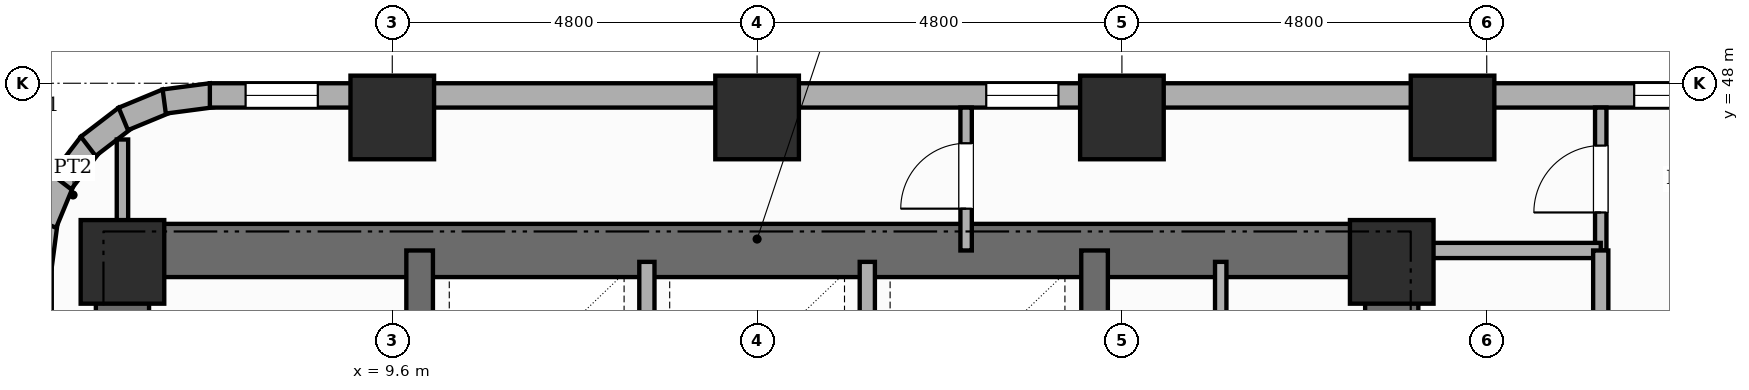
"""IFC4 building model, lengths in metres.
Left out: names, types, materials, properties, quantities, classifications, styles, units other than length and angle.
Written with IfcOpenShell. Run it as: python <this file> out.ifc"""

import sys

from ifc_helpers import new_model, si_unit, direction, frame, frame_2d, origin, origin_2d, place, context, subcontext, project, spatial, rectangle, extrude, element, fill, save


model = new_model("IFC4")
c1 = context("Model", 3, precision=1e-05, world=origin(), true_north=direction((0.0, 1.0)))
c2 = subcontext(c1, "Body", "Model", "MODEL_VIEW")
j1 = project(units=[si_unit("LENGTHUNIT", "METRE"), si_unit("PLANEANGLEUNIT", "RADIAN")], contexts=[c1])
p1 = place(None, origin())
s1 = spatial("IfcSite", under=j1, at=p1, CompositionType="ELEMENT")
p2 = place(p1, origin())
s2 = spatial("IfcBuilding", under=s1, at=p2, CompositionType="ELEMENT")
p3 = place(p2, frame((0.0, 0.0, 25.0)))
s3 = spatial("IfcBuildingStorey", under=s2, at=p3, CompositionType="ELEMENT", Elevation=25.0)
p4 = place(p3, frame((6.05, 30.55, 0.0), z_axis=(0.0, 0.0, 1.0), x_axis=(0.0, 1.0, 0.0)))
e1 = element("IfcWall", 1, at=p4, inside=s3, PredefinedType="SHEAR", context=c2, shape_type="SweptSolid", body=[
    extrude(rectangle(XDim=15.6, YDim=0.7, at=frame_2d((7.8, 0.0))), origin(), (0.0, 0.0, 1.0), 3.6),
])
p5 = place(p3, frame((22.75, 30.55, 0.0), z_axis=(0.0, 0.0, 1.0), x_axis=(0.0, 1.0, 0.0)))
e2 = element("IfcWall", 2, at=p5, inside=s3, PredefinedType="SHEAR", context=c2, shape_type="SweptSolid", body=[
    extrude(rectangle(XDim=15.6, YDim=0.7, at=frame_2d((7.8, 0.0))), origin(), (0.0, 0.0, 1.0), 3.6),
])
p6 = place(p5, frame((10.8, 0.0, 0.0)))
e3 = element("IfcOpeningElement", 3, at=p6, cuts=e2, PredefinedType="OPENING", context=c2, shape_type="SweptSolid", body=[
    extrude(rectangle(XDim=1.0, YDim=2.15, at=frame_2d((0.5, 1.075))), frame((0.0, 0.36, 0.0), z_axis=(0.0, -1.0, 0.0), x_axis=(1.0, 0.0, 0.0)), (0.0, 0.0, 1.0), 0.72),
])
p7 = place(p3, frame((6.05, 45.8, 0.0), z_axis=(0.0, 0.0, 1.0), x_axis=(1.0, 0.0, 0.0)))
e4 = element("IfcWall", 4, at=p7, inside=s3, PredefinedType="SHEAR", context=c2, shape_type="SweptSolid", body=[
    extrude(rectangle(XDim=16.7, YDim=0.7, at=frame_2d((8.35, 0.0))), origin(), (0.0, 0.0, 1.0), 3.6),
])
p8 = place(p3, frame((9.96, 30.9, 0.0), z_axis=(0.0, 0.0, 1.0), x_axis=(0.0, 1.0, 0.0)))
e5 = element("IfcWall", 5, at=p8, inside=s3, PredefinedType="SHEAR", context=c2, shape_type="SweptSolid", body=[
    extrude(rectangle(XDim=14.9, YDim=0.35, at=frame_2d((7.45, 0.0))), origin(), (0.0, 0.0, 1.0), 3.6),
])
p9 = place(p8, frame((0.65, 0.0, 0.0)))
e6 = element("IfcOpeningElement", 6, at=p9, cuts=e5, PredefinedType="OPENING", context=c2, shape_type="SweptSolid", body=[
    extrude(rectangle(XDim=0.95, YDim=2.1, at=frame_2d((0.475, 1.05))), frame((0.0, 0.185, 0.0), z_axis=(0.0, -1.0, 0.0), x_axis=(1.0, 0.0, 0.0)), (0.0, 0.0, 1.0), 0.37),
])
p10 = place(p8, frame((10.45, 0.0, 0.0)))
e7 = element("IfcOpeningElement", 7, at=p10, cuts=e5, PredefinedType="OPENING", context=c2, shape_type="SweptSolid", body=[
    extrude(rectangle(XDim=1.0, YDim=2.15, at=frame_2d((0.5, 1.075))), frame((0.0, 0.185, 0.0), z_axis=(0.0, -1.0, 0.0), x_axis=(1.0, 0.0, 0.0)), (0.0, 0.0, 1.0), 0.37),
])
p11 = place(p3, frame((18.84, 30.9, 0.0), z_axis=(0.0, 0.0, 1.0), x_axis=(0.0, 1.0, 0.0)))
e8 = element("IfcWall", 8, at=p11, inside=s3, PredefinedType="SHEAR", context=c2, shape_type="SweptSolid", body=[
    extrude(rectangle(XDim=14.9, YDim=0.35, at=frame_2d((7.45, 0.0))), origin(), (0.0, 0.0, 1.0), 3.6),
])
p12 = place(p11, frame((0.65, 0.0, 0.0)))
e9 = element("IfcOpeningElement", 9, at=p12, cuts=e8, PredefinedType="OPENING", context=c2, shape_type="SweptSolid", body=[
    extrude(rectangle(XDim=0.95, YDim=2.1, at=frame_2d((0.475, 1.05))), frame((0.0, 0.185, 0.0), z_axis=(0.0, -1.0, 0.0), x_axis=(1.0, 0.0, 0.0)), (0.0, 0.0, 1.0), 0.37),
])
p13 = place(p11, frame((10.45, 0.0, 0.0)))
e10 = element("IfcOpeningElement", 10, at=p13, cuts=e8, PredefinedType="OPENING", context=c2, shape_type="SweptSolid", body=[
    extrude(rectangle(XDim=1.0, YDim=2.15, at=frame_2d((0.5, 1.075))), frame((0.0, 0.185, 0.0), z_axis=(0.0, -1.0, 0.0), x_axis=(1.0, 0.0, 0.0)), (0.0, 0.0, 1.0), 0.37),
])
for number, where, z_axis, x_axis in (
    (11, (6.05, 45.65, 0.0), (0.0, 0.0, 1.0), (1.0, 0.0, 0.0)),
    (12, (9.6, 47.55, 0.0), (0.0, 0.0, 1.0), (1.0, 0.0, 0.0)),
    (13, (14.4, 47.55, 0.0), (0.0, 0.0, 1.0), (1.0, 0.0, 0.0)),
    (14, (19.2, 47.55, 0.0), (0.0, 0.0, 1.0), (1.0, 0.0, 0.0)),
    (15, (22.75, 45.65, 0.0), (0.0, 0.0, 1.0), (1.0, 0.0, 0.0)),
    (16, (23.55, 47.55, 0.0), (0.0, 0.0, 1.0), (1.0, 0.0, 0.0)),
):
    element("IfcColumn", number, at=place(p3, frame(where, z_axis=z_axis, x_axis=x_axis)), inside=s3, PredefinedType="COLUMN", context=c2, shape_type="SweptSolid", body=[
        extrude(rectangle(XDim=1.1, YDim=1.1, at=origin_2d()), origin(), (0.0, 0.0, 1.0), 3.6),
    ])
for number, where, z_axis, x_axis in (
    (17, (4.958, 45.579, 0.0), (0.0, 0.0, 1.0), (0.131, 0.991, 0.0)),
    (18, (5.03, 46.16, 0.0), (0.0, 0.0, 1.0), (0.383, 0.924, 0.0)),
):
    element("IfcWall", number, at=place(p3, frame(where, z_axis=z_axis, x_axis=x_axis)), inside=s3, PredefinedType="STANDARD", context=c2, shape_type="SweptSolid", body=[
        extrude(rectangle(XDim=0.626, YDim=0.32, at=frame_2d((0.313, 0.0))), origin(), (0.0, 0.0, 1.0), 3.35),
    ])
p14 = place(p3, frame((5.248, 46.703, 0.0), z_axis=(0.0, 0.0, 1.0), x_axis=(0.608938521285, 0.7932174212, 0.0)))
e19 = element("IfcWall", 19, at=p14, inside=s3, PredefinedType="STANDARD", context=c2, shape_type="SweptSolid", body=[
    extrude(rectangle(XDim=0.627, YDim=0.32, at=frame_2d((0.313, 0.0))), origin(), (0.0, 0.0, 1.0), 3.35),
])
p15 = place(p3, frame((5.6, 47.17, 0.0), z_axis=(0.0, 0.0, 1.0), x_axis=(0.793405610854, 0.608693302629, 0.0)))
e20 = element("IfcWall", 20, at=p15, inside=s3, PredefinedType="STANDARD", context=c2, shape_type="SweptSolid", body=[
    extrude(rectangle(XDim=0.626, YDim=0.32, at=frame_2d((0.313, 0.0))), origin(), (0.0, 0.0, 1.0), 3.35),
])
p16 = place(p3, frame((6.061, 47.531, 0.0), z_axis=(0.0, 0.0, 1.0), x_axis=(0.923836271867, 0.382787856107, 0.0)))
e21 = element("IfcWall", 21, at=p16, inside=s3, PredefinedType="STANDARD", context=c2, shape_type="SweptSolid", body=[
    extrude(rectangle(XDim=0.626, YDim=0.32, at=frame_2d((0.313, 0.0))), origin(), (0.0, 0.0, 1.0), 3.35),
])
p17 = place(p3, frame((6.6, 47.76, 0.0), z_axis=(0.0, 0.0, 1.0), x_axis=(0.991447664465, 0.130504898859, 0.0)))
e22 = element("IfcWall", 22, at=p17, inside=s3, PredefinedType="STANDARD", context=c2, shape_type="SweptSolid", body=[
    extrude(rectangle(XDim=0.627, YDim=0.32, at=frame_2d((0.313, 0.0))), origin(), (0.0, 0.0, 1.0), 3.35),
])
p18 = place(p3, frame((7.2, 47.84, 0.0), z_axis=(0.0, 0.0, 1.0), x_axis=(1.0, 0.0, 0.0)))
e23 = element("IfcWall", 23, at=p18, inside=s3, PredefinedType="STANDARD", context=c2, shape_type="SweptSolid", body=[
    extrude(rectangle(XDim=48.0, YDim=0.32, at=frame_2d((24.0, 0.0))), origin(), (0.0, 0.0, 1.0), 2.53),
])
p19 = place(p18, frame((24.97, 0.0, 0.45)))
e24 = element("IfcOpeningElement", 24, at=p19, cuts=e23, PredefinedType="OPENING", context=c2, shape_type="SweptSolid", body=[
    extrude(rectangle(XDim=0.6, YDim=1.8, at=frame_2d((0.3, 0.9))), frame((0.0, 0.17, 0.0), z_axis=(0.0, -1.0, 0.0), x_axis=(1.0, 0.0, 0.0)), (0.0, 0.0, 1.0), 0.34),
])
p20 = place(p18, frame((32.435, 0.0, 0.65)))
e25 = element("IfcOpeningElement", 25, at=p20, cuts=e23, PredefinedType="OPENING", context=c2, shape_type="SweptSolid", body=[
    extrude(rectangle(XDim=1.4, YDim=1.1, at=frame_2d((0.7, 0.55))), frame((0.0, 0.17, 0.0), z_axis=(0.0, -1.0, 0.0), x_axis=(1.0, 0.0, 0.0)), (0.0, 0.0, 1.0), 0.34),
])
p21 = place(p18, frame((47.094, 0.0, 0.45)))
e26 = element("IfcOpeningElement", 26, at=p21, cuts=e23, PredefinedType="OPENING", context=c2, shape_type="SweptSolid", body=[
    extrude(rectangle(XDim=0.6, YDim=1.8, at=frame_2d((0.3, 0.9))), frame((0.0, 0.17, 0.0), z_axis=(0.0, -1.0, 0.0), x_axis=(1.0, 0.0, 0.0)), (0.0, 0.0, 1.0), 0.34),
])
p22 = place(p18, frame((18.74, 0.0, 0.45)))
e27 = element("IfcOpeningElement", 27, at=p22, cuts=e23, PredefinedType="OPENING", context=c2, shape_type="SweptSolid", body=[
    extrude(rectangle(XDim=0.95, YDim=1.8, at=frame_2d((0.475, 0.9))), frame((0.0, 0.17, 0.0), z_axis=(0.0, -1.0, 0.0), x_axis=(1.0, 0.0, 0.0)), (0.0, 0.0, 1.0), 0.34),
])
p23 = place(p18, frame((41.65, 0.0, 0.45)))
e28 = element("IfcOpeningElement", 28, at=p23, cuts=e23, PredefinedType="OPENING", context=c2, shape_type="SweptSolid", body=[
    extrude(rectangle(XDim=0.75, YDim=1.8, at=frame_2d((0.375, 0.9))), frame((0.0, 0.17, 0.0), z_axis=(0.0, -1.0, 0.0), x_axis=(1.0, 0.0, 0.0)), (0.0, 0.0, 1.0), 0.34),
])
p24 = place(p18, frame((37.736, 0.0, 0.65)))
e29 = element("IfcOpeningElement", 29, at=p24, cuts=e23, PredefinedType="OPENING", context=c2, shape_type="SweptSolid", body=[
    extrude(rectangle(XDim=1.4, YDim=1.1, at=frame_2d((0.7, 0.55))), frame((0.0, 0.17, 0.0), z_axis=(0.0, -1.0, 0.0), x_axis=(1.0, 0.0, 0.0)), (0.0, 0.0, 1.0), 0.34),
])
p25 = place(p18, frame((0.47, 0.0, 0.45)))
e30 = element("IfcOpeningElement", 30, at=p25, cuts=e23, PredefinedType="OPENING", context=c2, shape_type="SweptSolid", body=[
    extrude(rectangle(XDim=0.95, YDim=1.8, at=frame_2d((0.475, 0.9))), frame((0.0, 0.17, 0.0), z_axis=(0.0, -1.0, 0.0), x_axis=(1.0, 0.0, 0.0)), (0.0, 0.0, 1.0), 0.34),
])
p26 = place(p18, frame((10.215, 0.0, 0.45)))
e31 = element("IfcOpeningElement", 31, at=p26, cuts=e23, PredefinedType="OPENING", context=c2, shape_type="SweptSolid", body=[
    extrude(rectangle(XDim=0.95, YDim=1.8, at=frame_2d((0.475, 0.9))), frame((0.0, 0.17, 0.0), z_axis=(0.0, -1.0, 0.0), x_axis=(1.0, 0.0, 0.0)), (0.0, 0.0, 1.0), 0.34),
])
p27 = place(p18, frame((22.87, 0.0, 0.65)))
e32 = element("IfcOpeningElement", 32, at=p27, cuts=e23, PredefinedType="OPENING", context=c2, shape_type="SweptSolid", body=[
    extrude(rectangle(XDim=1.4, YDim=1.1, at=frame_2d((0.7, 0.55))), frame((0.0, 0.17, 0.0), z_axis=(0.0, -1.0, 0.0), x_axis=(1.0, 0.0, 0.0)), (0.0, 0.0, 1.0), 0.34),
])
p28 = place(p18, frame((28.03, 0.0, 0.65)))
e33 = element("IfcOpeningElement", 33, at=p28, cuts=e23, PredefinedType="OPENING", context=c2, shape_type="SweptSolid", body=[
    extrude(rectangle(XDim=1.4, YDim=1.1, at=frame_2d((0.7, 0.55))), frame((0.0, 0.17, 0.0), z_axis=(0.0, -1.0, 0.0), x_axis=(1.0, 0.0, 0.0)), (0.0, 0.0, 1.0), 0.34),
])
p29 = place(p18, frame((42.95, 0.0, 0.65)))
e34 = element("IfcOpeningElement", 34, at=p29, cuts=e23, PredefinedType="OPENING", context=c2, shape_type="SweptSolid", body=[
    extrude(rectangle(XDim=1.4, YDim=1.1, at=frame_2d((0.7, 0.55))), frame((0.0, 0.17, 0.0), z_axis=(0.0, -1.0, 0.0), x_axis=(1.0, 0.0, 0.0)), (0.0, 0.0, 1.0), 0.34),
])
p30 = place(p18, frame((45.984, 0.0, 0.45)))
e35 = element("IfcOpeningElement", 35, at=p30, cuts=e23, PredefinedType="OPENING", context=c2, shape_type="SweptSolid", body=[
    extrude(rectangle(XDim=0.6, YDim=1.8, at=frame_2d((0.3, 0.9))), frame((0.0, 0.17, 0.0), z_axis=(0.0, -1.0, 0.0), x_axis=(1.0, 0.0, 0.0)), (0.0, 0.0, 1.0), 0.34),
])
for number, where, z_axis, x_axis in (
    (36, (12.95, 43.1, 0.0), (0.0, 0.0, 1.0), (0.0, 1.0, 0.0)),
    (37, (15.85, 43.1, 0.0), (0.0, 0.0, 1.0), (0.0, 1.0, 0.0)),
):
    element("IfcWall", number, at=place(p3, frame(where, z_axis=z_axis, x_axis=x_axis)), inside=s3, PredefinedType="POLYGONAL", context=c2, shape_type="SweptSolid", body=[
        extrude(rectangle(XDim=2.55, YDim=0.2, at=frame_2d((1.275, 0.0))), origin(), (0.0, 0.0, 1.0), 3.35),
    ])
p31 = place(p3, frame((20.5, 43.05, 0.0), z_axis=(0.0, 0.0, 1.0), x_axis=(0.0, 1.0, 0.0)))
e38 = element("IfcWall", 38, at=p31, inside=s3, PredefinedType="PARTITIONING", context=c2, shape_type="SweptSolid", body=[
    extrude(rectangle(XDim=2.6, YDim=0.15, at=frame_2d((1.3, 0.0))), origin(), (0.0, 0.0, 1.0), 3.35),
])
p32 = place(p3, frame((25.5, 45.8, 0.0), z_axis=(0.0, 0.0, 1.0), x_axis=(0.0, 1.0, 0.0)))
e39 = element("IfcWall", 39, at=p32, inside=s3, PredefinedType="PARTITIONING", context=c2, shape_type="SweptSolid", body=[
    extrude(rectangle(XDim=1.88, YDim=0.15, at=frame_2d((0.94, 0.0))), origin(), (0.0, 0.0, 1.0), 3.35),
])
p33 = place(p32, frame((0.5, 0.0, 0.0)))
e40 = element("IfcOpeningElement", 40, at=p33, cuts=e39, PredefinedType="OPENING", context=c2, shape_type="SweptSolid", body=[
    extrude(rectangle(XDim=0.88, YDim=2.1, at=frame_2d((0.44, 1.05))), frame((0.0, 0.085, 0.0), z_axis=(0.0, -1.0, 0.0), x_axis=(1.0, 0.0, 0.0)), (0.0, 0.0, 1.0), 0.17),
])
p34 = place(p3, frame((22.75, 45.8, 0.0), z_axis=(0.0, 0.0, 1.0), x_axis=(1.0, 0.0, 0.0)))
e41 = element("IfcWall", 41, at=p34, inside=s3, PredefinedType="PARTITIONING", context=c2, shape_type="SweptSolid", body=[
    extrude(rectangle(XDim=2.75, YDim=0.2, at=frame_2d((1.375, 0.0))), origin(), (0.0, 0.0, 1.0), 3.35),
])
p35 = place(p3, frame((6.05, 45.8, 0.0), z_axis=(0.0, 0.0, 1.0), x_axis=(0.0, 1.0, 0.0)))
e42 = element("IfcWall", 42, at=p35, inside=s3, PredefinedType="PARTITIONING", context=c2, shape_type="SweptSolid", body=[
    extrude(rectangle(XDim=1.46, YDim=0.15, at=frame_2d((0.73, 0.0))), origin(), (0.0, 0.0, 1.0), 3.35),
])
p36 = place(p3, frame((17.15, 45.8, 0.0), z_axis=(0.0, 0.0, 1.0), x_axis=(0.0, 1.0, 0.0)))
e43 = element("IfcWall", 43, at=p36, inside=s3, PredefinedType="PARTITIONING", context=c2, shape_type="SweptSolid", body=[
    extrude(rectangle(XDim=1.88, YDim=0.15, at=frame_2d((0.94, 0.0))), origin(), (0.0, 0.0, 1.0), 3.35),
])
p37 = place(p36, frame((0.55, 0.0, 0.0)))
e44 = element("IfcOpeningElement", 44, at=p37, cuts=e43, PredefinedType="OPENING", context=c2, shape_type="SweptSolid", body=[
    extrude(rectangle(XDim=0.86, YDim=2.1, at=frame_2d((0.43, 1.05))), frame((0.0, 0.085, 0.0), z_axis=(0.0, -1.0, 0.0), x_axis=(1.0, 0.0, 0.0)), (0.0, 0.0, 1.0), 0.17),
])
p38 = place(p3, frame((25.5, 43.05, 0.0), z_axis=(0.0, 0.0, 1.0), x_axis=(0.0, 1.0, 0.0)))
e45 = element("IfcWall", 45, at=p38, inside=s3, PredefinedType="PARTITIONING", context=c2, shape_type="SweptSolid", body=[
    extrude(rectangle(XDim=2.75, YDim=0.2, at=frame_2d((1.375, 0.0))), origin(), (0.0, 0.0, 1.0), 3.35),
])
p39 = place(p22, origin())
e46 = element("IfcWindow", 46, at=p39, inside=s3, PartitioningType="SINGLE_PANEL", PredefinedType="WINDOW", context=c2, shape_type="SweptSolid", body=[
    extrude(rectangle(XDim=0.95, YDim=1.8, at=frame_2d((0.475, 0.9))), frame((0.0, 0.03, 0.0), z_axis=(0.0, -1.0, 0.0), x_axis=(1.0, 0.0, 0.0)), (0.0, 0.0, 1.0), 0.06),
])
fill(e27, e46)
p40 = place(p25, origin())
e47 = element("IfcWindow", 47, at=p40, inside=s3, PartitioningType="SINGLE_PANEL", PredefinedType="WINDOW", context=c2, shape_type="SweptSolid", body=[
    extrude(rectangle(XDim=0.95, YDim=1.8, at=frame_2d((0.475, 0.9))), frame((0.0, 0.03, 0.0), z_axis=(0.0, -1.0, 0.0), x_axis=(1.0, 0.0, 0.0)), (0.0, 0.0, 1.0), 0.06),
])
fill(e30, e47)
p41 = place(p26, origin())
e48 = element("IfcWindow", 48, at=p41, inside=s3, PartitioningType="SINGLE_PANEL", PredefinedType="WINDOW", context=c2, shape_type="SweptSolid", body=[
    extrude(rectangle(XDim=0.95, YDim=1.8, at=frame_2d((0.475, 0.9))), frame((0.0, 0.03, 0.0), z_axis=(0.0, -1.0, 0.0), x_axis=(1.0, 0.0, 0.0)), (0.0, 0.0, 1.0), 0.06),
])
fill(e31, e48)
p42 = place(p33, origin())
e49 = element("IfcDoor", 49, at=p42, inside=s3, OperationType="SINGLE_SWING_LEFT", PredefinedType="DOOR", context=c2, shape_type="SweptSolid", body=[
    extrude(rectangle(XDim=0.88, YDim=2.1, at=frame_2d((0.44, 1.05))), frame((0.0, 0.025, 0.0), z_axis=(0.0, -1.0, 0.0), x_axis=(1.0, 0.0, 0.0)), (0.0, 0.0, 1.0), 0.05),
])
fill(e40, e49)
p43 = place(p37, origin())
e50 = element("IfcDoor", 50, at=p43, inside=s3, OperationType="SINGLE_SWING_LEFT", PredefinedType="DOOR", context=c2, shape_type="SweptSolid", body=[
    extrude(rectangle(XDim=0.86, YDim=2.1, at=frame_2d((0.43, 1.05))), frame((0.0, 0.025, 0.0), z_axis=(0.0, -1.0, 0.0), x_axis=(1.0, 0.0, 0.0)), (0.0, 0.0, 1.0), 0.05),
])
fill(e44, e50)
save(model, sys.argv[1])
